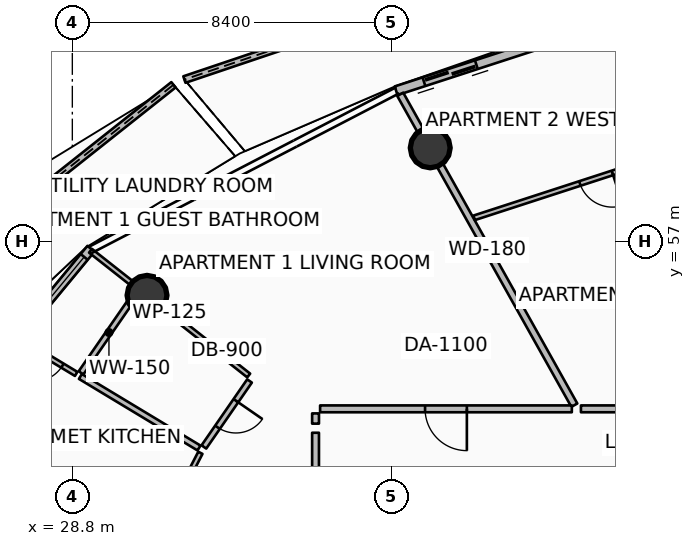
"""IFC4 building model, lengths in metres.
Left out: names, types, materials, properties, quantities, classifications, styles, units other than length and angle.
Written with IfcOpenShell. Run it as: python <this file> out.ifc"""

import sys

from ifc_helpers import new_model, si_unit, direction, frame, frame_2d, origin, origin_2d, place, context, subcontext, project, spatial, polyline, rectangle, circle, outline, extrude, element, fill, save


model = new_model("IFC4")
c1 = context("Model", 3, precision=1e-05, world=origin(), true_north=direction((0.0, 1.0)))
c2 = subcontext(c1, "Body", "Model", "MODEL_VIEW")
j1 = project(units=[si_unit("LENGTHUNIT", "METRE"), si_unit("PLANEANGLEUNIT", "RADIAN")], contexts=[c1])
p1 = place(None, origin())
s1 = spatial("IfcSite", under=j1, at=p1, CompositionType="ELEMENT")
p2 = place(p1, origin())
s2 = spatial("IfcBuilding", under=s1, at=p2, CompositionType="ELEMENT")
p3 = place(p2, frame((0.0, 0.0, 172.8)))
s3 = spatial("IfcBuildingStorey", under=s2, at=p3, CompositionType="ELEMENT", Elevation=172.8)
p4 = place(p3, frame((38.218, 59.467, 0.0), z_axis=(-0.104922147102, 0.187279626204, 0.976687096596), x_axis=(-0.872415530407, -0.488764915173, 0.0)))
e1 = element("IfcColumn", 1, at=p4, inside=s3, PredefinedType="COLUMN", context=c2, shape_type="SweptSolid", body=[
    extrude(circle(Radius=0.525, at=origin_2d()), origin(), (0.0, 0.0, 1.0), 3.43),
])
p5 = place(p3, frame((30.766, 55.586, 0.0), z_axis=(-0.184003795843, 0.145034951903, 0.972166377654), x_axis=(-0.619036183506, -0.785362466324, 0.0)))
e2 = element("IfcColumn", 2, at=p5, inside=s3, PredefinedType="COLUMN", context=c2, shape_type="SweptSolid", body=[
    extrude(circle(Radius=0.525, at=origin_2d()), origin(), (0.0, 0.0, 1.0), 3.446),
])
p6 = place(p3, frame((40.64, 64.263, 0.0), z_axis=(0.0, 0.0, 1.0), x_axis=(-0.947571676397, -0.319543296113, 0.0)))
e3 = element("IfcWall", 3, at=p6, inside=s3, PredefinedType="PARAPET", context=c2, shape_type="SweptSolid", body=[
    extrude(outline(polyline([(0.0, 0.0), (9.383, 0.0), (9.383, 1.747), (4.691, 1.562), (0.0, 1.348), (0.0, 0.0)])), frame((0.0, 0.09, 0.0), z_axis=(0.0, -1.0, 0.0), x_axis=(1.0, 0.0, 0.0)), (0.0, 0.0, 1.0), 0.18),
])
p7 = place(p3, frame((31.461, 61.126, 0.0), z_axis=(0.0, 0.0, 1.0), x_axis=(-0.783643972098, -0.621210209989, 0.0)))
e4 = element("IfcWall", 4, at=p7, inside=s3, PredefinedType="PARAPET", context=c2, shape_type="SweptSolid", body=[
    extrude(outline(polyline([(0.0, 0.0), (10.365, 0.0), (10.365, 1.832), (5.182, 1.853), (0.0, 1.756), (0.0, 0.0)])), frame((0.0, 0.09, 0.0), z_axis=(0.0, -1.0, 0.0), x_axis=(1.0, 0.0, 0.0)), (0.0, 0.0, 1.0), 0.18),
])
p8 = place(p3, frame((45.49, 63.624, 0.0), z_axis=(0.0, 0.0, 1.0), x_axis=(-0.951046390632, -0.309048156224, 0.0)))
e5 = element("IfcWall", 5, at=p8, inside=s3, PredefinedType="SOLIDWALL", context=c2, shape_type="SweptSolid", body=[
    extrude(rectangle(XDim=8.59, YDim=0.24, at=frame_2d((4.295, 0.0))), origin(), (0.0, 0.0, 1.0), 2.3),
])
p9 = place(p8, frame((6.37, 0.0, 0.0)))
e6 = element("IfcOpeningElement", 6, at=p9, cuts=e5, PredefinedType="OPENING", context=c2, shape_type="SweptSolid", body=[
    extrude(rectangle(XDim=1.45, YDim=2.15, at=frame_2d((0.725, 1.075))), frame((0.0, 0.13, 0.0), z_axis=(0.0, -1.0, 0.0), x_axis=(1.0, 0.0, 0.0)), (0.0, 0.0, 1.0), 0.26),
])
p10 = place(p8, frame((0.28, 0.0, 0.65)))
e7 = element("IfcOpeningElement", 7, at=p10, cuts=e5, PredefinedType="OPENING", context=c2, shape_type="SweptSolid", body=[
    extrude(rectangle(XDim=1.6, YDim=1.5, at=frame_2d((0.8, 0.75))), frame((0.0, 0.13, 0.0), z_axis=(0.0, -1.0, 0.0), x_axis=(1.0, 0.0, 0.0)), (0.0, 0.0, 1.0), 0.26),
])
p11 = place(p3, frame((29.291, 56.813, 0.0), z_axis=(0.0, 0.0, 1.0), x_axis=(-0.636771922292, -0.77105221547, 0.0)))
e8 = element("IfcWall", 8, at=p11, inside=s3, PredefinedType="SOLIDWALL", context=c2, shape_type="SweptSolid", body=[
    extrude(rectangle(XDim=10.082, YDim=0.24, at=frame_2d((5.041, 0.0))), origin(), (0.0, 0.0, 1.0), 2.3),
])
p12 = place(p11, frame((7.862, 0.0, 0.0)))
e9 = element("IfcOpeningElement", 9, at=p12, cuts=e8, PredefinedType="OPENING", context=c2, shape_type="SweptSolid", body=[
    extrude(rectangle(XDim=1.45, YDim=2.15, at=frame_2d((0.725, 1.075))), frame((0.0, 0.13, 0.0), z_axis=(0.0, -1.0, 0.0), x_axis=(1.0, 0.0, 0.0)), (0.0, 0.0, 1.0), 0.26),
])
p13 = place(p11, frame((0.28, 0.0, 0.65)))
e10 = element("IfcOpeningElement", 10, at=p13, cuts=e8, PredefinedType="OPENING", context=c2, shape_type="SweptSolid", body=[
    extrude(rectangle(XDim=1.6, YDim=1.5, at=frame_2d((0.8, 0.75))), frame((0.0, 0.13, 0.0), z_axis=(0.0, -1.0, 0.0), x_axis=(1.0, 0.0, 0.0)), (0.0, 0.0, 1.0), 0.26),
])
p14 = place(p3, frame((42.01, 52.696, 0.0), z_axis=(0.0, 0.0, 1.0), x_axis=(-0.488627157427, 0.872492693967, 0.0)))
e11 = element("IfcWall", 11, at=p14, inside=s3, PredefinedType="PARTITIONING", context=c2, shape_type="SweptSolid", body=[
    extrude(rectangle(XDim=9.375, YDim=0.18, at=frame_2d((4.688, 0.0))), origin(), (0.0, 0.0, 1.0), 2.307),
])
p15 = place(p3, frame((41.944, 52.6, 0.0), z_axis=(0.0, 0.0, 1.0), x_axis=(-1.0, 0.0, 0.0)))
e12 = element("IfcWall", 12, at=p15, inside=s3, PredefinedType="PARTITIONING", context=c2, shape_type="SweptSolid", body=[
    extrude(rectangle(XDim=6.624, YDim=0.18, at=frame_2d((3.312, 0.0))), origin(), (0.0, 0.0, 1.0), 2.307),
])
p16 = place(p15, frame((2.762, 0.0, 0.0)))
e13 = element("IfcOpeningElement", 13, at=p16, cuts=e12, PredefinedType="OPENING", context=c2, shape_type="SweptSolid", body=[
    extrude(rectangle(XDim=1.1, YDim=2.1, at=frame_2d((0.55, 1.05))), frame((0.0, 0.1, 0.0), z_axis=(0.0, -1.0, 0.0), x_axis=(1.0, 0.0, 0.0)), (0.0, 0.0, 1.0), 0.2),
])
p17 = place(p3, frame((35.2, 52.48, 0.0), z_axis=(0.0, 0.0, 1.0), x_axis=(0.0, -1.0, 0.0)))
e14 = element("IfcWall", 14, at=p17, inside=s3, PredefinedType="PARTITIONING", context=c2, shape_type="SweptSolid", body=[
    extrude(rectangle(XDim=0.269, YDim=0.18, at=frame_2d((0.135, 0.0))), origin(), (0.0, 0.0, 1.0), 2.307),
])
p18 = place(p3, frame((35.2, 51.971, 0.0), z_axis=(0.0, 0.0, 1.0), x_axis=(0.0, -1.0, 0.0)))
e15 = element("IfcWall", 15, at=p18, inside=s3, PredefinedType="PARTITIONING", context=c2, shape_type="SweptSolid", body=[
    extrude(rectangle(XDim=6.241, YDim=0.18, at=frame_2d((3.12, 0.0))), origin(), (0.0, 0.0, 1.0), 2.307),
])
p19 = place(p3, frame((33.441, 53.477, 0.0), z_axis=(0.0, 0.0, 1.0), x_axis=(-0.785319981095, 0.619090080112, 0.0)))
e16 = element("IfcWall", 16, at=p19, inside=s3, PredefinedType="PARTITIONING", context=c2, shape_type="SweptSolid", body=[
    extrude(rectangle(XDim=5.301, YDim=0.125, at=frame_2d((2.65, 0.0))), origin(), (0.0, 0.0, 1.0), 2.307),
])
p20 = place(p3, frame((33.463, 53.333, 0.0), z_axis=(0.0, 0.0, 1.0), x_axis=(-0.568843105688, -0.822446059697, 0.0)))
e17 = element("IfcWall", 17, at=p20, inside=s3, PredefinedType="PARTITIONING", context=c2, shape_type="SweptSolid", body=[
    extrude(rectangle(XDim=2.111, YDim=0.15, at=frame_2d((1.056, 0.0))), origin(), (0.0, 0.0, 1.0), 2.307),
])
p21 = place(p20, frame((0.631, 0.0, 0.0)))
e18 = element("IfcOpeningElement", 18, at=p21, cuts=e17, PredefinedType="OPENING", context=c2, shape_type="SweptSolid", body=[
    extrude(rectangle(XDim=0.85, YDim=2.06, at=frame_2d((0.425, 1.03))), frame((0.0, 0.085, 0.0), z_axis=(0.0, -1.0, 0.0), x_axis=(1.0, 0.0, 0.0)), (0.0, 0.0, 1.0), 0.17),
])
p22 = place(p3, frame((30.498, 55.67, 0.0), z_axis=(0.0, 0.0, 1.0), x_axis=(-0.56886579211, -0.822430368218, 0.0)))
e19 = element("IfcWall", 19, at=p22, inside=s3, PredefinedType="PARTITIONING", context=c2, shape_type="SweptSolid", body=[
    extrude(rectangle(XDim=2.582, YDim=0.15, at=frame_2d((1.291, 0.0))), origin(), (0.0, 0.0, 1.0), 2.307),
])
p23 = place(p3, frame((32.133, 51.57, 0.0), z_axis=(0.0, 0.0, 1.0), x_axis=(-0.856320461768, 0.516444834186, 0.0)))
e20 = element("IfcWall", 20, at=p23, inside=s3, PredefinedType="PARTITIONING", context=c2, shape_type="SweptSolid", body=[
    extrude(rectangle(XDim=3.645, YDim=0.15, at=frame_2d((1.822, 0.0))), origin(), (0.0, 0.0, 1.0), 2.79),
])
p24 = place(p3, frame((28.901, 53.519, 0.0), z_axis=(0.0, 0.0, 1.0), x_axis=(-0.856306503803, 0.516467977269, 0.0)))
e21 = element("IfcWall", 21, at=p24, inside=s3, PredefinedType="PARTITIONING", context=c2, shape_type="SweptSolid", body=[
    extrude(rectangle(XDim=1.692, YDim=0.125, at=frame_2d((0.846, 0.0))), origin(), (0.0, 0.0, 1.0), 2.325),
])
p25 = place(p24, frame((0.421, 0.0, 0.0)))
e22 = element("IfcOpeningElement", 22, at=p25, cuts=e21, PredefinedType="OPENING", context=c2, shape_type="SweptSolid", body=[
    extrude(rectangle(XDim=0.85, YDim=2.06, at=frame_2d((0.425, 1.03))), frame((0.0, 0.073, 0.0), z_axis=(0.0, -1.0, 0.0), x_axis=(1.0, 0.0, 0.0)), (0.0, 0.0, 1.0), 0.145),
])
p26 = place(p3, frame((30.998, 49.365, 0.0), z_axis=(0.0, 0.0, 1.0), x_axis=(-0.917591640713, 0.397524314845, 0.0)))
e23 = element("IfcWall", 23, at=p26, inside=s3, PredefinedType="PARTITIONING", context=c2, shape_type="SweptSolid", body=[
    extrude(rectangle(XDim=6.182, YDim=0.125, at=frame_2d((3.091, 0.0))), origin(), (0.0, 0.0, 1.0), 2.325),
])
p27 = place(p3, frame((32.169, 51.443, 0.0), z_axis=(0.0, 0.0, 1.0), x_axis=(-0.458020211203, -0.888941778819, 0.0)))
e24 = element("IfcWall", 24, at=p27, inside=s3, PredefinedType="PARTITIONING", context=c2, shape_type="SweptSolid", body=[
    extrude(rectangle(XDim=2.297, YDim=0.125, at=frame_2d((1.149, 0.0))), origin(), (0.0, 0.0, 1.0), 2.79),
])
p28 = place(p27, frame((0.724, 0.0, 0.0)))
e25 = element("IfcOpeningElement", 25, at=p28, cuts=e24, PredefinedType="OPENING", context=c2, shape_type="SweptSolid", body=[
    extrude(rectangle(XDim=0.85, YDim=2.06, at=frame_2d((0.425, 1.03))), frame((0.0, 0.073, 0.0), z_axis=(0.0, -1.0, 0.0), x_axis=(1.0, 0.0, 0.0)), (0.0, 0.0, 1.0), 0.145),
])
p29 = place(p3, frame((46.625, 52.6, 0.0), z_axis=(0.0, 0.0, 1.0), x_axis=(-1.0, 0.0, 0.0)))
e26 = element("IfcWall", 26, at=p29, inside=s3, PredefinedType="PARTITIONING", context=c2, shape_type="SweptSolid", body=[
    extrude(rectangle(XDim=4.442, YDim=0.18, at=frame_2d((2.221, 0.0))), origin(), (0.0, 0.0, 1.0), 2.307),
])
p30 = place(p3, frame((45.795, 59.712, 0.0), z_axis=(0.0, 0.0, 1.0), x_axis=(-0.951056650279, -0.309016582016, 0.0)))
e27 = element("IfcWall", 27, at=p30, inside=s3, PredefinedType="PARTITIONING", context=c2, shape_type="SweptSolid", body=[
    extrude(rectangle(XDim=6.753, YDim=0.125, at=frame_2d((3.376, 0.0))), origin(), (0.0, 0.0, 1.0), 2.307),
])
p31 = place(p30, frame((2.926, 0.0, 0.0)))
e28 = element("IfcOpeningElement", 28, at=p31, cuts=e27, PredefinedType="OPENING", context=c2, shape_type="SweptSolid", body=[
    extrude(rectangle(XDim=0.9, YDim=2.08, at=frame_2d((0.45, 1.04))), frame((0.0, 0.073, 0.0), z_axis=(0.0, -1.0, 0.0), x_axis=(1.0, 0.0, 0.0)), (0.0, 0.0, 1.0), 0.145),
])
p32 = place(p9, origin())
e29 = element("IfcDoor", 29, at=p32, inside=s3, OperationType="DOUBLE_DOOR_SLIDING", PredefinedType="DOOR", context=c2, shape_type="SweptSolid", body=[
    extrude(rectangle(XDim=1.45, YDim=2.15, at=frame_2d((0.725, 1.075))), frame((0.0, 0.025, 0.0), z_axis=(0.0, -1.0, 0.0), x_axis=(1.0, 0.0, 0.0)), (0.0, 0.0, 1.0), 0.05),
])
fill(e6, e29)
p33 = place(p13, origin())
e30 = element("IfcWindow", 30, at=p33, inside=s3, PartitioningType="SINGLE_PANEL", PredefinedType="WINDOW", context=c2, shape_type="SweptSolid", body=[
    extrude(rectangle(XDim=1.6, YDim=1.5, at=frame_2d((0.8, 0.75))), frame((0.0, 0.03, 0.0), z_axis=(0.0, -1.0, 0.0), x_axis=(1.0, 0.0, 0.0)), (0.0, 0.0, 1.0), 0.06),
])
fill(e10, e30)
p34 = place(p16, origin())
e31 = element("IfcDoor", 31, at=p34, inside=s3, OperationType="SINGLE_SWING_LEFT", PredefinedType="DOOR", context=c2, shape_type="SweptSolid", body=[
    extrude(rectangle(XDim=1.1, YDim=2.1, at=frame_2d((0.55, 1.05))), frame((0.0, 0.025, 0.0), z_axis=(0.0, -1.0, 0.0), x_axis=(1.0, 0.0, 0.0)), (0.0, 0.0, 1.0), 0.05),
])
fill(e13, e31)
p35 = place(p21, origin())
e32 = element("IfcDoor", 32, at=p35, inside=s3, OperationType="SINGLE_SWING_LEFT", PredefinedType="DOOR", context=c2, shape_type="SweptSolid", body=[
    extrude(rectangle(XDim=0.85, YDim=2.06, at=frame_2d((0.425, 1.03))), frame((0.0, 0.025, 0.0), z_axis=(0.0, -1.0, 0.0), x_axis=(1.0, 0.0, 0.0)), (0.0, 0.0, 1.0), 0.05),
])
fill(e18, e32)
p36 = place(p25, origin())
e33 = element("IfcDoor", 33, at=p36, inside=s3, OperationType="SINGLE_SWING_RIGHT", PredefinedType="DOOR", context=c2, shape_type="SweptSolid", body=[
    extrude(rectangle(XDim=0.85, YDim=2.06, at=frame_2d((0.425, 1.03))), frame((0.0, 0.025, 0.0), z_axis=(0.0, -1.0, 0.0), x_axis=(1.0, 0.0, 0.0)), (0.0, 0.0, 1.0), 0.05),
])
fill(e22, e33)
p37 = place(p31, origin())
e34 = element("IfcDoor", 34, at=p37, inside=s3, OperationType="SINGLE_SWING_LEFT", PredefinedType="DOOR", context=c2, shape_type="SweptSolid", body=[
    extrude(rectangle(XDim=0.9, YDim=2.08, at=frame_2d((0.45, 1.04))), frame((0.0, 0.025, 0.0), z_axis=(0.0, -1.0, 0.0), x_axis=(1.0, 0.0, 0.0)), (0.0, 0.0, 1.0), 0.05),
])
fill(e28, e34)
save(model, sys.argv[1])
